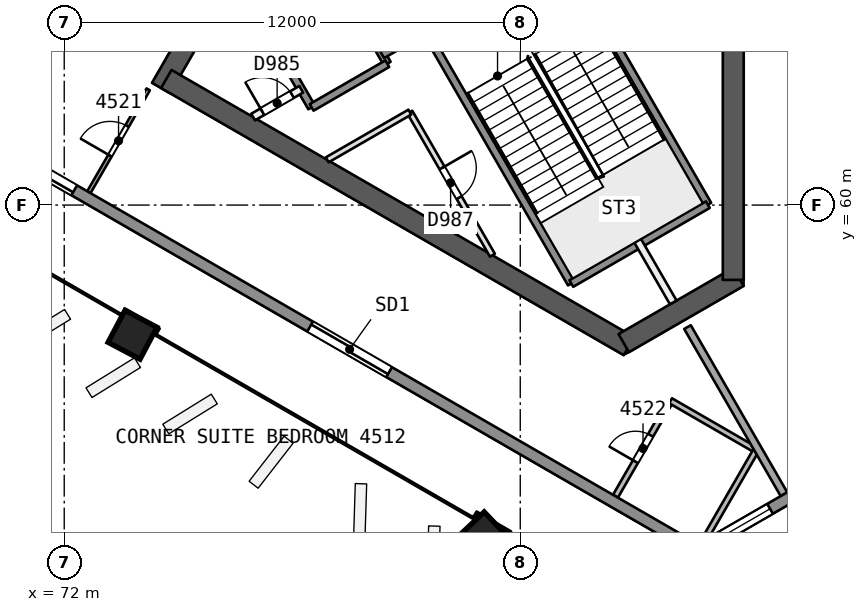
"""IFC4 building model, lengths in metres.
Left out: names, types, materials, properties, quantities, classifications, styles, units other than length and angle.
Written with IfcOpenShell. Run it as: python <this file> out.ifc"""

import sys

from ifc_helpers import new_model, si_unit, direction, frame, frame_2d, origin, origin_2d, place, context, subcontext, project, spatial, rectangle, extrude, element, fill, save


model = new_model("IFC4")
c1 = context("Model", 3, precision=1e-05, world=origin(), true_north=direction((0.0, 1.0)))
c2 = subcontext(c1, "Body", "Model", "MODEL_VIEW")
j1 = project(units=[si_unit("LENGTHUNIT", "METRE"), si_unit("PLANEANGLEUNIT", "RADIAN")], contexts=[c1])
p1 = place(None, origin())
s1 = spatial("IfcSite", under=j1, at=p1, CompositionType="ELEMENT")
p2 = place(p1, origin())
s2 = spatial("IfcBuilding", under=s1, at=p2, CompositionType="ELEMENT")
p3 = place(p2, frame((0.0, 0.0, 185.9)))
s3 = spatial("IfcBuildingStorey", under=s2, at=p3, CompositionType="ELEMENT", Elevation=185.9)
p4 = place(p3, frame((79.659, 71.931, 0.0), z_axis=(0.0, 0.0, 1.0), x_axis=(-0.500000202252, -0.866025287014, 0.0)))
e1 = element("IfcWall", 1, at=p4, inside=s3, PredefinedType="SHEAR", context=c2, shape_type="SweptSolid", body=[
    extrude(rectangle(XDim=10.221, YDim=0.55, at=frame_2d((5.111, 0.0))), origin(), (0.0, 0.0, 1.0), 3.7),
])
p5 = place(p4, frame((0.791, 0.0, 0.0)))
e2 = element("IfcOpeningElement", 2, at=p5, cuts=e1, PredefinedType="OPENING", context=c2, shape_type="SweptSolid", body=[
    extrude(rectangle(XDim=1.2, YDim=2.1, at=frame_2d((0.6, 1.05))), frame((0.0, 0.286, 0.0), z_axis=(0.0, -1.0, 0.0), x_axis=(1.0, 0.0, 0.0)), (0.0, 0.0, 1.0), 0.571),
])
p6 = place(p3, frame((74.686, 63.317, 0.0), z_axis=(0.0, 0.0, 1.0), x_axis=(0.866024505738, -0.500001555459, 0.0)))
e3 = element("IfcWall", 3, at=p6, inside=s3, PredefinedType="SHEAR", context=c2, shape_type="SweptSolid", body=[
    extrude(rectangle(XDim=14.059, YDim=0.55, at=frame_2d((7.029, 0.0))), origin(), (0.0, 0.0, 1.0), 3.7),
])
p7 = place(p3, frame((86.723, 56.367, 0.0), z_axis=(0.0, 0.0, 1.0), x_axis=(0.865997833373, 0.500047750313, 0.0)))
e4 = element("IfcWall", 4, at=p7, inside=s3, PredefinedType="SHEAR", context=c2, shape_type="SweptSolid", body=[
    extrude(rectangle(XDim=3.487, YDim=0.55, at=frame_2d((1.743, 0.0))), origin(), (0.0, 0.0, 1.0), 3.7),
])
p8 = place(p3, frame((89.605, 58.031, 0.0), z_axis=(0.0, 0.0, 1.0), x_axis=(0.0, 1.0, 0.0)))
e5 = element("IfcWall", 5, at=p8, inside=s3, PredefinedType="SHEAR", context=c2, shape_type="SweptSolid", body=[
    extrude(rectangle(XDim=14.175, YDim=0.55, at=frame_2d((7.087, 0.0))), origin(), (0.0, 0.0, 1.0), 3.7),
])
p9 = place(p3, frame((73.796, 56.559, 0.0), z_axis=(0.000857522362, 0.02282328747, 0.99973914708), x_axis=(-0.499938957707, -0.865825156964, 0.020194953204)))
e6 = element("IfcColumn", 6, at=p9, inside=s3, PredefinedType="COLUMN", context=c2, shape_type="SweptSolid", body=[
    extrude(rectangle(XDim=0.95, YDim=0.95, at=origin_2d()), origin(), (0.0, 0.0, 1.0), 3.701),
])
p10 = place(p3, frame((83.042, 51.22, 0.0), z_axis=(-0.008375902173, 0.028161497857, 0.999568293966), x_axis=(-0.500227504793, -0.865658431816, 0.020197100638)))
e7 = element("IfcColumn", 7, at=p10, inside=s3, PredefinedType="COLUMN", context=c2, shape_type="SweptSolid", body=[
    extrude(rectangle(XDim=0.95, YDim=0.95, at=origin_2d()), origin(), (0.0, 0.0, 1.0), 3.702),
])
p11 = place(p3, frame((92.29, 50.054, 0.0), z_axis=(-0.017605877014, 0.030464101799, 0.99938079409), x_axis=(0.500055612053, -0.865278195987, 0.035185627802)))
e8 = element("IfcColumn", 8, at=p11, inside=s3, PredefinedType="COLUMN", context=c2, shape_type="SweptSolid", body=[
    extrude(rectangle(XDim=2.2, YDim=2.2, at=origin_2d()), origin(), (0.0, 0.0, 1.0), 3.702),
])
p12 = place(p3, frame((88.401, 56.789, 0.0), z_axis=(0.0, 0.0, 1.0), x_axis=(0.499970777499, -0.866042274746, 0.0)))
e9 = element("IfcWall", 9, at=p12, inside=s3, PredefinedType="PARTITIONING", context=c2, shape_type="SweptSolid", body=[
    extrude(rectangle(XDim=5.078, YDim=0.2, at=frame_2d((2.539, 0.0))), origin(), (0.0, 0.0, 1.0), 3.25),
])
for number, where, z_axis, x_axis in (
    (10, (66.573, 63.845, 0.0), (0.0, 0.0, 1.0), (0.5, 0.866, 0.0)),
    (11, (69.948, 61.897, 0.0), (0.0, 0.0, 1.0), (0.5, 0.866, 0.0)),
):
    element("IfcWall", number, at=place(p3, frame(where, z_axis=z_axis, x_axis=x_axis)), inside=s3, PredefinedType="PARTITIONING", context=c2, shape_type="SweptSolid", body=[
        extrude(rectangle(XDim=11.104, YDim=0.2, at=frame_2d((5.552, 0.0))), origin(), (0.0, 0.0, 1.0), 3.25),
    ])
p13 = place(p3, frame((72.648, 60.338, 0.0), z_axis=(0.0, 0.0, 1.0), x_axis=(0.4999794672, 0.866037258078, 0.0)))
e12 = element("IfcWall", 12, at=p13, inside=s3, PredefinedType="PARTITIONING", context=c2, shape_type="SweptSolid", body=[
    extrude(rectangle(XDim=3.125, YDim=0.1, at=frame_2d((1.562, 0.0))), origin(), (0.0, 0.0, 1.0), 3.25),
])
p14 = place(p13, frame((1.112, 0.0, 0.0)))
e13 = element("IfcOpeningElement", 13, at=p14, cuts=e12, PredefinedType="OPENING", context=c2, shape_type="SweptSolid", body=[
    extrude(rectangle(XDim=0.9, YDim=2.1, at=frame_2d((0.45, 1.05))), frame((0.0, 0.061, 0.0), z_axis=(0.0, -1.0, 0.0), x_axis=(1.0, 0.0, 0.0)), (0.0, 0.0, 1.0), 0.121),
])
p15 = place(p3, frame((86.506, 52.34, 0.0), z_axis=(0.0, 0.0, 1.0), x_axis=(0.499987231761, 0.866032775405, 0.0)))
e14 = element("IfcWall", 14, at=p15, inside=s3, PredefinedType="PARTITIONING", context=c2, shape_type="SweptSolid", body=[
    extrude(rectangle(XDim=2.9, YDim=0.15, at=frame_2d((1.45, 0.0))), origin(), (0.0, 0.0, 1.0), 3.25),
])
p16 = place(p15, frame((1.05, 0.0, 0.0)))
e15 = element("IfcOpeningElement", 15, at=p16, cuts=e14, PredefinedType="OPENING", context=c2, shape_type="SweptSolid", body=[
    extrude(rectangle(XDim=0.8, YDim=2.1, at=frame_2d((0.4, 1.05))), frame((0.0, 0.085, 0.0), z_axis=(0.0, -1.0, 0.0), x_axis=(1.0, 0.0, 0.0)), (0.0, 0.0, 1.0), 0.171),
])
p17 = place(p3, frame((87.956, 54.851, 0.0), z_axis=(0.0, 0.0, 1.0), x_axis=(0.866021400173, -0.500006934395, 0.0)))
e16 = element("IfcWall", 16, at=p17, inside=s3, PredefinedType="PARTITIONING", context=c2, shape_type="SweptSolid", body=[
    extrude(rectangle(XDim=2.6, YDim=0.15, at=frame_2d((1.3, 0.0))), origin(), (0.0, 0.0, 1.0), 3.25),
])
p18 = place(p3, frame((90.207, 53.551, 0.0), z_axis=(0.0, 0.0, 1.0), x_axis=(-0.500007607708, -0.866021011428, 0.0)))
e17 = element("IfcWall", 17, at=p18, inside=s3, PredefinedType="PARTITIONING", context=c2, shape_type="SweptSolid", body=[
    extrude(rectangle(XDim=2.742, YDim=0.15, at=frame_2d((1.371, 0.0))), origin(), (0.0, 0.0, 1.0), 3.25),
])
p19 = place(p3, frame((93.353, 53.612, 0.0), z_axis=(0.0, 0.0, 1.0), x_axis=(-0.866025202232, -0.500000349099, 0.0)))
e18 = element("IfcWall", 18, at=p19, inside=s3, PredefinedType="SOLIDWALL", context=c2, shape_type="SweptSolid", body=[
    extrude(rectangle(XDim=5.399, YDim=0.3, at=frame_2d((2.7, 0.0))), origin(), (0.0, 0.0, 1.0), 3.25),
])
p20 = place(p19, frame((3.209, 0.0, 0.9)))
e19 = element("IfcOpeningElement", 19, at=p20, cuts=e18, PredefinedType="OPENING", context=c2, shape_type="SweptSolid", body=[
    extrude(rectangle(XDim=1.8, YDim=1.5, at=frame_2d((0.9, 0.75))), frame((0.0, 0.161, 0.0), z_axis=(0.0, -1.0, 0.0), x_axis=(1.0, 0.0, 0.0)), (0.0, 0.0, 1.0), 0.321),
])
p21 = place(p19, frame((0.407, 0.0, 0.9)))
e20 = element("IfcOpeningElement", 20, at=p21, cuts=e18, PredefinedType="OPENING", context=c2, shape_type="SweptSolid", body=[
    extrude(rectangle(XDim=1.8, YDim=1.5, at=frame_2d((0.9, 0.75))), frame((0.0, 0.161, 0.0), z_axis=(0.0, -1.0, 0.0), x_axis=(1.0, 0.0, 0.0)), (0.0, 0.0, 1.0), 0.321),
])
p22 = place(p3, frame((88.677, 50.912, 0.0), z_axis=(0.0, 0.0, 1.0), x_axis=(-0.866024890781, 0.500000888547, 0.0)))
e21 = element("IfcWall", 21, at=p22, inside=s3, PredefinedType="SOLIDWALL", context=c2, shape_type="SweptSolid", body=[
    extrude(rectangle(XDim=52.776, YDim=0.3, at=frame_2d((26.388, 0.0))), origin(), (0.0, 0.0, 1.0), 3.25),
])
p23 = place(p22, frame((18.953, 0.0, 0.0)))
e22 = element("IfcOpeningElement", 22, at=p23, cuts=e21, PredefinedType="OPENING", context=c2, shape_type="SweptSolid", body=[
    extrude(rectangle(XDim=2.4, YDim=2.4, at=frame_2d((1.2, 1.2))), frame((0.0, 0.161, 0.0), z_axis=(0.0, -1.0, 0.0), x_axis=(1.0, 0.0, 0.0)), (0.0, 0.0, 1.0), 0.321),
])
p24 = place(p22, frame((9.385, 0.0, 0.0)))
e23 = element("IfcOpeningElement", 23, at=p24, cuts=e21, PredefinedType="OPENING", context=c2, shape_type="SweptSolid", body=[
    extrude(rectangle(XDim=2.4, YDim=2.4, at=frame_2d((1.2, 1.2))), frame((0.0, 0.161, 0.0), z_axis=(0.0, -1.0, 0.0), x_axis=(1.0, 0.0, 0.0)), (0.0, 0.0, 1.0), 0.321),
])
p25 = place(p22, frame((39.984, 0.0, 0.0)))
e24 = element("IfcOpeningElement", 24, at=p25, cuts=e21, PredefinedType="OPENING", context=c2, shape_type="SweptSolid", body=[
    extrude(rectangle(XDim=2.4, YDim=2.4, at=frame_2d((1.2, 1.2))), frame((0.0, 0.161, 0.0), z_axis=(0.0, -1.0, 0.0), x_axis=(1.0, 0.0, 0.0)), (0.0, 0.0, 1.0), 0.321),
])
p26 = place(p22, frame((26.657, 0.0, 0.9)))
e25 = element("IfcOpeningElement", 25, at=p26, cuts=e21, PredefinedType="OPENING", context=c2, shape_type="SweptSolid", body=[
    extrude(rectangle(XDim=1.8, YDim=1.5, at=frame_2d((0.9, 0.75))), frame((0.0, 0.161, 0.0), z_axis=(0.0, -1.0, 0.0), x_axis=(1.0, 0.0, 0.0)), (0.0, 0.0, 1.0), 0.321),
])
p27 = place(p22, frame((22.76, 0.0, 0.9)))
e26 = element("IfcOpeningElement", 26, at=p27, cuts=e21, PredefinedType="OPENING", context=c2, shape_type="SweptSolid", body=[
    extrude(rectangle(XDim=1.8, YDim=1.5, at=frame_2d((0.9, 0.75))), frame((0.0, 0.161, 0.0), z_axis=(0.0, -1.0, 0.0), x_axis=(1.0, 0.0, 0.0)), (0.0, 0.0, 1.0), 0.321),
])
p28 = place(p3, frame((77.135, 64.952, 0.0), z_axis=(0.0, 0.0, 1.0), x_axis=(0.499996545922, -0.866027397988, 0.0)))
e27 = element("IfcWall", 27, at=p28, inside=s3, PredefinedType="SOLIDWALL", context=c2, shape_type="SweptSolid", body=[
    extrude(rectangle(XDim=2.75, YDim=0.2, at=frame_2d((1.375, 0.0))), origin(), (0.0, 0.0, 1.0), 3.25),
])
p29 = place(p3, frame((81.094, 62.445, 0.0), z_axis=(0.0, 0.0, 1.0), x_axis=(0.499980071345, -0.866036909293, 0.0)))
e28 = element("IfcWall", 28, at=p29, inside=s3, PredefinedType="PARTITIONING", context=c2, shape_type="SweptSolid", body=[
    extrude(rectangle(XDim=4.348, YDim=0.15, at=frame_2d((2.174, 0.0))), origin(), (0.0, 0.0, 1.0), 3.25),
])
p30 = place(p29, frame((1.697, 0.0, 0.0)))
e29 = element("IfcOpeningElement", 29, at=p30, cuts=e28, PredefinedType="OPENING", context=c2, shape_type="SweptSolid", body=[
    extrude(rectangle(XDim=0.9, YDim=2.1, at=frame_2d((0.45, 1.05))), frame((0.0, 0.085, 0.0), z_axis=(0.0, -1.0, 0.0), x_axis=(1.0, 0.0, 0.0)), (0.0, 0.0, 1.0), 0.171),
])
p31 = place(p3, frame((79.127, 66.102, 0.0), z_axis=(0.0, 0.0, 1.0), x_axis=(0.499996545922, -0.866027397988, 0.0)))
e30 = element("IfcWall", 30, at=p31, inside=s3, PredefinedType="SOLIDWALL", context=c2, shape_type="SweptSolid", body=[
    extrude(rectangle(XDim=2.75, YDim=0.2, at=frame_2d((1.375, 0.0))), origin(), (0.0, 0.0, 1.0), 3.25),
])
p32 = place(p3, frame((81.493, 64.604, 0.0), z_axis=(0.0, 0.0, 1.0), x_axis=(0.500006057782, -0.866021906294, 0.0)))
e31 = element("IfcWall", 31, at=p32, inside=s3, PredefinedType="SOLIDWALL", context=c2, shape_type="SweptSolid", body=[
    extrude(rectangle(XDim=7.7, YDim=0.2, at=frame_2d((3.85, 0.0))), origin(), (0.0, 0.0, 1.0), 3.25),
])
p33 = place(p3, frame((87.09, 59.06, 0.0), z_axis=(0.0, 0.0, 1.0), x_axis=(0.499951854219, -0.86605319898, 0.0)))
e32 = element("IfcWall", 32, at=p33, inside=s3, PredefinedType="PARTITIONING", context=c2, shape_type="SweptSolid", body=[
    extrude(rectangle(XDim=1.873, YDim=0.2, at=frame_2d((0.937, 0.0))), origin(), (0.0, 0.0, 1.0), 3.25),
])
p34 = place(p3, frame((85.087, 66.679, 0.0), z_axis=(0.0, 0.0, 1.0), x_axis=(0.500019787375, -0.866013979237, 0.0)))
e33 = element("IfcWall", 33, at=p34, inside=s3, PredefinedType="SOLIDWALL", context=c2, shape_type="SweptSolid", body=[
    extrude(rectangle(XDim=7.7, YDim=0.2, at=frame_2d((3.85, 0.0))), origin(), (0.0, 0.0, 1.0), 3.25),
])
p35 = place(p34, frame((0.55, 0.0, 0.0)))
e34 = element("IfcOpeningElement", 34, at=p35, cuts=e33, PredefinedType="OPENING", context=c2, shape_type="SweptSolid", body=[
    extrude(rectangle(XDim=1.1, YDim=2.1, at=frame_2d((0.55, 1.05))), frame((0.0, 0.11, 0.0), z_axis=(0.0, -1.0, 0.0), x_axis=(1.0, 0.0, 0.0)), (0.0, 0.0, 1.0), 0.221),
])
p36 = place(p3, frame((76.97, 62.316, 0.0), z_axis=(0.0, 0.0, 1.0), x_axis=(0.865982457891, 0.500074377092, 0.0)))
e35 = element("IfcWall", 35, at=p36, inside=s3, PredefinedType="PARTITIONING", context=c2, shape_type="SweptSolid", body=[
    extrude(rectangle(XDim=1.461, YDim=0.2, at=frame_2d((0.73, 0.0))), origin(), (0.0, 0.0, 1.0), 3.25),
])
p37 = place(p36, frame((0.281, 0.0, 0.0)))
e36 = element("IfcOpeningElement", 36, at=p37, cuts=e35, PredefinedType="OPENING", context=c2, shape_type="SweptSolid", body=[
    extrude(rectangle(XDim=0.9, YDim=2.1, at=frame_2d((0.45, 1.05))), frame((0.0, 0.11, 0.0), z_axis=(0.0, -1.0, 0.0), x_axis=(1.0, 0.0, 0.0)), (0.0, 0.0, 1.0), 0.221),
])
p38 = place(p3, frame((80.367, 63.954, 0.0), z_axis=(0.0, 0.0, 1.0), x_axis=(0.866026575979, 0.499997969693, 0.0)))
e37 = element("IfcWall", 37, at=p38, inside=s3, PredefinedType="SOLIDWALL", context=c2, shape_type="SweptSolid", body=[
    extrude(rectangle(XDim=6.75, YDim=0.2, at=frame_2d((3.375, 0.0))), origin(), (0.0, 0.0, 1.0), 3.25),
])
p39 = place(p3, frame((78.51, 62.57, 0.0), z_axis=(0.0, 0.0, 1.0), x_axis=(0.866053019151, 0.499952165731, 0.0)))
e38 = element("IfcWall", 38, at=p39, inside=s3, PredefinedType="SOLIDWALL", context=c2, shape_type="SweptSolid", body=[
    extrude(rectangle(XDim=2.3, YDim=0.2, at=frame_2d((1.15, 0.0))), origin(), (0.0, 0.0, 1.0), 3.25),
])
p40 = place(p3, frame((78.92, 61.19, 0.0), z_axis=(0.0, 0.0, 1.0), x_axis=(0.866038211682, 0.499977815414, 0.0)))
e39 = element("IfcWall", 39, at=p40, inside=s3, PredefinedType="PARTITIONING", context=c2, shape_type="SweptSolid", body=[
    extrude(rectangle(XDim=2.51, YDim=0.15, at=frame_2d((1.255, 0.0))), origin(), (0.0, 0.0, 1.0), 3.25),
])
p41 = place(p3, frame((85.343, 57.935, 0.0), z_axis=(0.0, 0.0, 1.0), x_axis=(0.866004344652, 0.500036473714, 0.0)))
e40 = element("IfcWall", 40, at=p41, inside=s3, PredefinedType="SOLIDWALL", context=c2, shape_type="SweptSolid", body=[
    extrude(rectangle(XDim=4.15, YDim=0.2, at=frame_2d((2.075, 0.0))), origin(), (0.0, 0.0, 1.0), 3.25),
])
p42 = place(p14, origin())
e41 = element("IfcDoor", 41, at=p42, inside=s3, OperationType="SINGLE_SWING_LEFT", PredefinedType="NOTDEFINED", context=c2, shape_type="SweptSolid", body=[
    extrude(rectangle(XDim=0.9, YDim=2.1, at=frame_2d((0.45, 1.05))), frame((0.0, 0.025, 0.0), z_axis=(0.0, -1.0, 0.0), x_axis=(1.0, 0.0, 0.0)), (0.0, 0.0, 1.0), 0.05),
])
fill(e13, e41)
p43 = place(p16, origin())
e42 = element("IfcDoor", 42, at=p43, inside=s3, OperationType="SINGLE_SWING_LEFT", PredefinedType="NOTDEFINED", context=c2, shape_type="SweptSolid", body=[
    extrude(rectangle(XDim=0.8, YDim=2.1, at=frame_2d((0.4, 1.05))), frame((0.0, 0.025, 0.0), z_axis=(0.0, -1.0, 0.0), x_axis=(1.0, 0.0, 0.0)), (0.0, 0.0, 1.0), 0.05),
])
fill(e15, e42)
p44 = place(p20, origin())
e43 = element("IfcWindow", 43, at=p44, inside=s3, PartitioningType="SINGLE_PANEL", PredefinedType="WINDOW", context=c2, shape_type="SweptSolid", body=[
    extrude(rectangle(XDim=1.8, YDim=1.5, at=frame_2d((0.9, 0.75))), frame((0.0, 0.03, 0.0), z_axis=(0.0, -1.0, 0.0), x_axis=(1.0, 0.0, 0.0)), (0.0, 0.0, 1.0), 0.06),
])
fill(e19, e43)
p45 = place(p23, origin())
e44 = element("IfcDoor", 44, at=p45, inside=s3, OperationType="SLIDING_TO_LEFT", PredefinedType="NOTDEFINED", context=c2, shape_type="SweptSolid", body=[
    extrude(rectangle(XDim=2.4, YDim=2.4, at=frame_2d((1.2, 1.2))), frame((0.0, 0.025, 0.0), z_axis=(0.0, -1.0, 0.0), x_axis=(1.0, 0.0, 0.0)), (0.0, 0.0, 1.0), 0.05),
])
fill(e22, e44)
p46 = place(p24, origin())
e45 = element("IfcDoor", 45, at=p46, inside=s3, OperationType="SLIDING_TO_RIGHT", PredefinedType="NOTDEFINED", context=c2, shape_type="SweptSolid", body=[
    extrude(rectangle(XDim=2.4, YDim=2.4, at=frame_2d((1.2, 1.2))), frame((0.0, 0.025, 0.0), z_axis=(0.0, -1.0, 0.0), x_axis=(1.0, 0.0, 0.0)), (0.0, 0.0, 1.0), 0.05),
])
fill(e23, e45)
p47 = place(p37, origin())
e46 = element("IfcDoor", 46, at=p47, inside=s3, OperationType="SINGLE_SWING_LEFT", PredefinedType="NOTDEFINED", context=c2, shape_type="SweptSolid", body=[
    extrude(rectangle(XDim=0.9, YDim=2.1, at=frame_2d((0.45, 1.05))), frame((0.0, 0.025, 0.0), z_axis=(0.0, -1.0, 0.0), x_axis=(1.0, 0.0, 0.0)), (0.0, 0.0, 1.0), 0.05),
])
fill(e36, e46)
p48 = place(p30, origin())
e47 = element("IfcDoor", 47, at=p48, inside=s3, OperationType="SINGLE_SWING_LEFT", PredefinedType="NOTDEFINED", context=c2, shape_type="SweptSolid", body=[
    extrude(rectangle(XDim=0.9, YDim=2.1, at=frame_2d((0.45, 1.05))), frame((0.0, 0.025, 0.0), z_axis=(0.0, -1.0, 0.0), x_axis=(1.0, 0.0, 0.0)), (0.0, 0.0, 1.0), 0.05),
])
fill(e29, e47)
save(model, sys.argv[1])
